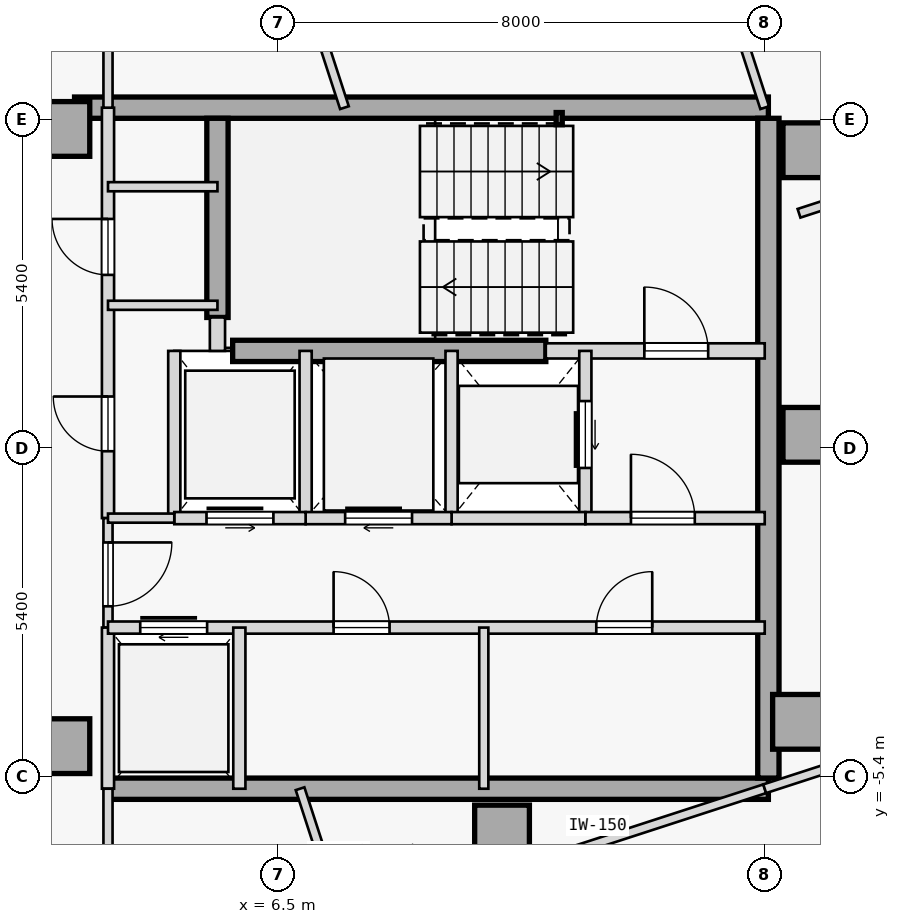
"""IFC4 building model, lengths in metres.
Left out: names, types, materials, properties, quantities, classifications, styles, units other than length and angle.
Written with IfcOpenShell. Run it as: python <this file> out.ifc"""

import sys

from ifc_helpers import new_model, si_unit, direction, frame, frame_2d, origin, origin_2d, place, context, subcontext, project, spatial, rectangle, hollow_rectangle, extrude, element, fill, save


model = new_model("IFC4")
c1 = context("Model", 3, precision=1e-05, world=origin(), true_north=direction((0.0, 1.0)))
c2 = subcontext(c1, "Body", "Model", "MODEL_VIEW")
j1 = project(units=[si_unit("LENGTHUNIT", "METRE"), si_unit("PLANEANGLEUNIT", "RADIAN")], contexts=[c1])
p1 = place(None, origin())
s1 = spatial("IfcSite", under=j1, at=p1, CompositionType="ELEMENT")
p2 = place(p1, origin())
s2 = spatial("IfcBuilding", under=s1, at=p2, CompositionType="ELEMENT")
p3 = place(p2, frame((0.0, 0.0, 241.05)))
s3 = spatial("IfcBuildingStorey", under=s2, at=p3, CompositionType="ELEMENT", Elevation=241.05)
for number, where, z_axis, x_axis in (
    (1, (15.25, 4.9, 0.0), (0.0, 0.0, 1.0), (1.0, 0.0, 0.0)),
    (2, (15.25, 0.22, 0.0), (0.0, 0.0, 1.0), (1.0, 0.0, 0.0)),
    (3, (15.08, -4.5, 0.0), (0.0, 0.0, 1.0), (1.0, 0.0, 0.0)),
    (4, (10.18, -6.32, 0.0), (0.0, 0.0, 1.0), (1.0, 0.0, 0.0)),
    (5, (2.95, -4.9, 0.0), (0.0, 0.0, 1.0), (1.0, 0.0, 0.0)),
    (6, (2.95, 5.25, 0.0), (0.0, 0.0, 1.0), (1.0, 0.0, 0.0)),
):
    element("IfcColumn", number, at=place(p3, frame(where, z_axis=z_axis, x_axis=x_axis)), inside=s3, PredefinedType="COLUMN", context=c2, shape_type="SweptSolid", body=[
        extrude(rectangle(XDim=0.9, YDim=0.9, at=origin_2d()), origin(), (0.0, 0.0, 1.0), 3.35),
    ])
p4 = place(p3, frame((3.15, 5.6, 0.0), z_axis=(0.0, 0.0, 1.0), x_axis=(1.0, 0.0, 0.0)))
e7 = element("IfcWall", 7, at=p4, inside=s3, PredefinedType="SHEAR", context=c2, shape_type="SweptSolid", body=[
    extrude(rectangle(XDim=11.41, YDim=0.35, at=frame_2d((5.705, 0.0))), origin(), (0.0, 0.0, 1.0), 3.125),
])
p5 = place(p3, frame((3.7, -5.6, 0.0), z_axis=(0.0, 0.0, 1.0), x_axis=(1.0, 0.0, 0.0)))
e8 = element("IfcWall", 8, at=p5, inside=s3, PredefinedType="SHEAR", context=c2, shape_type="SweptSolid", body=[
    extrude(rectangle(XDim=10.86, YDim=0.35, at=frame_2d((5.43, 0.0))), origin(), (0.0, 0.0, 1.0), 3.125),
])
p6 = place(p3, frame((14.56, -5.425, 0.0), z_axis=(0.0, 0.0, 1.0), x_axis=(0.0, 1.0, 0.0)))
e9 = element("IfcWall", 9, at=p6, inside=s3, PredefinedType="SHEAR", context=c2, shape_type="SweptSolid", body=[
    extrude(rectangle(XDim=10.85, YDim=0.35, at=frame_2d((5.425, 0.0))), origin(), (0.0, 0.0, 1.0), 3.125),
])
p7 = place(p3, frame((5.5, 2.15, 0.0), z_axis=(0.0, 0.0, 1.0), x_axis=(0.0, 1.0, 0.0)))
e10 = element("IfcWall", 10, at=p7, inside=s3, PredefinedType="SHEAR", context=c2, shape_type="SweptSolid", body=[
    extrude(rectangle(XDim=3.275, YDim=0.35, at=frame_2d((1.638, 0.0))), origin(), (0.0, 0.0, 1.0), 3.125),
])
p8 = place(p3, frame((5.75, 1.6, 0.0), z_axis=(0.0, 0.0, 1.0), x_axis=(1.0, 0.0, 0.0)))
e11 = element("IfcWall", 11, at=p8, inside=s3, PredefinedType="SHEAR", context=c2, shape_type="SweptSolid", body=[
    extrude(rectangle(XDim=5.15, YDim=0.35, at=frame_2d((2.575, 0.0))), origin(), (0.0, 0.0, 1.0), 3.125),
])
p9 = place(p3, frame((11.12, 5.42, 0.0), z_axis=(0.0, 0.0, 1.0), x_axis=(1.0, 0.0, 0.0)))
e12 = element("IfcColumn", 12, at=p9, inside=s3, PredefinedType="COLUMN", context=c2, shape_type="SweptSolid", body=[
    extrude(hollow_rectangle(XDim=0.1, YDim=0.2, WallThickness=0.008, at=origin_2d()), origin(), (0.0, 0.0, 1.0), 3.35),
])
p10 = place(p3, frame((10.9, 1.6, 0.0), z_axis=(0.0, 0.0, 1.0), x_axis=(1.0, 0.0, 0.0)))
e13 = element("IfcWall", 13, at=p10, inside=s3, PredefinedType="STANDARD", context=c2, shape_type="SweptSolid", body=[
    extrude(rectangle(XDim=3.6, YDim=0.25, at=frame_2d((1.8, 0.0))), origin(), (0.0, 0.0, 1.0), 3.125),
])
p11 = place(p10, frame((1.62, 0.0, 0.0)))
e14 = element("IfcOpeningElement", 14, at=p11, cuts=e13, PredefinedType="OPENING", context=c2, shape_type="SweptSolid", body=[
    extrude(rectangle(XDim=1.05, YDim=2.15, at=frame_2d((0.525, 1.075))), frame((0.0, 0.135, 0.0), z_axis=(0.0, -1.0, 0.0), x_axis=(1.0, 0.0, 0.0)), (0.0, 0.0, 1.0), 0.27),
])
p12 = place(p3, frame((5.5, 1.6, 0.0), z_axis=(0.0, 0.0, 1.0), x_axis=(0.0, 1.0, 0.0)))
e15 = element("IfcWall", 15, at=p12, inside=s3, PredefinedType="STANDARD", context=c2, shape_type="SweptSolid", body=[
    extrude(rectangle(XDim=0.55, YDim=0.25, at=frame_2d((0.275, 0.0))), origin(), (0.0, 0.0, 1.0), 3.125),
])
p13 = place(p3, frame((3.7, -1.15, 0.0), z_axis=(0.0, 0.0, 1.0), x_axis=(0.0, 1.0, 0.0)))
e16 = element("IfcWall", 16, at=p13, inside=s3, PredefinedType="STANDARD", context=c2, shape_type="SweptSolid", body=[
    extrude(rectangle(XDim=6.75, YDim=0.2, at=frame_2d((3.375, 0.0))), origin(), (0.0, 0.0, 1.0), 3.125),
])
p14 = place(p13, frame((1.1, 0.0, 0.0)))
e17 = element("IfcOpeningElement", 17, at=p14, cuts=e16, PredefinedType="OPENING", context=c2, shape_type="SweptSolid", body=[
    extrude(rectangle(XDim=0.9, YDim=2.15, at=frame_2d((0.45, 1.075))), frame((0.0, 0.11, 0.0), z_axis=(0.0, -1.0, 0.0), x_axis=(1.0, 0.0, 0.0)), (0.0, 0.0, 1.0), 0.22),
])
p15 = place(p13, frame((4.0, 0.0, 0.0)))
e18 = element("IfcOpeningElement", 18, at=p15, cuts=e16, PredefinedType="OPENING", context=c2, shape_type="SweptSolid", body=[
    extrude(rectangle(XDim=0.92, YDim=2.15, at=frame_2d((0.46, 1.075))), frame((0.0, 0.11, 0.0), z_axis=(0.0, -1.0, 0.0), x_axis=(1.0, 0.0, 0.0)), (0.0, 0.0, 1.0), 0.22),
])
p16 = place(p3, frame((3.7, -2.95, 0.0), z_axis=(0.0, 0.0, 1.0), x_axis=(0.0, 1.0, 0.0)))
e19 = element("IfcWall", 19, at=p16, inside=s3, PredefinedType="PARTITIONING", context=c2, shape_type="SweptSolid", body=[
    extrude(rectangle(XDim=1.8, YDim=0.15, at=frame_2d((0.9, 0.0))), origin(), (0.0, 0.0, 1.0), 3.125),
])
p17 = place(p16, frame((0.35, 0.0, 0.0)))
e20 = element("IfcOpeningElement", 20, at=p17, cuts=e19, PredefinedType="OPENING", context=c2, shape_type="SweptSolid", body=[
    extrude(rectangle(XDim=1.05, YDim=2.18, at=frame_2d((0.525, 1.09))), frame((0.0, 0.085, 0.0), z_axis=(0.0, -1.0, 0.0), x_axis=(1.0, 0.0, 0.0)), (0.0, 0.0, 1.0), 0.17),
])
p18 = place(p3, frame((3.7, -5.6, 0.0), z_axis=(0.0, 0.0, 1.0), x_axis=(0.0, 1.0, 0.0)))
e21 = element("IfcWall", 21, at=p18, inside=s3, PredefinedType="STANDARD", context=c2, shape_type="SweptSolid", body=[
    extrude(rectangle(XDim=2.65, YDim=0.2, at=frame_2d((1.325, 0.0))), origin(), (0.0, 0.0, 1.0), 3.125),
])
p19 = place(p3, frame((11.55, -1.15, 0.0), z_axis=(0.0, 0.0, 1.0), x_axis=(0.0, 1.0, 0.0)))
e22 = element("IfcWall", 22, at=p19, inside=s3, PredefinedType="STANDARD", context=c2, shape_type="SweptSolid", body=[
    extrude(rectangle(XDim=2.75, YDim=0.2, at=frame_2d((1.375, 0.0))), origin(), (0.0, 0.0, 1.0), 3.125),
])
p20 = place(p19, frame((0.825, 0.0, 0.0)))
e23 = element("IfcOpeningElement", 23, at=p20, cuts=e22, PredefinedType="OPENING", context=c2, shape_type="SweptSolid", body=[
    extrude(rectangle(XDim=1.1, YDim=2.15, at=frame_2d((0.55, 1.075))), frame((0.0, 0.11, 0.0), z_axis=(0.0, -1.0, 0.0), x_axis=(1.0, 0.0, 0.0)), (0.0, 0.0, 1.0), 0.22),
])
p21 = place(p3, frame((9.35, -1.15, 0.0), z_axis=(0.0, 0.0, 1.0), x_axis=(0.0, 1.0, 0.0)))
e24 = element("IfcWall", 24, at=p21, inside=s3, PredefinedType="STANDARD", context=c2, shape_type="SweptSolid", body=[
    extrude(rectangle(XDim=2.75, YDim=0.2, at=frame_2d((1.375, 0.0))), origin(), (0.0, 0.0, 1.0), 3.125),
])
p22 = place(p3, frame((11.55, -1.15, 0.0), z_axis=(0.0, 0.0, 1.0), x_axis=(1.0, 0.0, 0.0)))
e25 = element("IfcWall", 25, at=p22, inside=s3, PredefinedType="STANDARD", context=c2, shape_type="SweptSolid", body=[
    extrude(rectangle(XDim=2.95, YDim=0.2, at=frame_2d((1.475, 0.0))), origin(), (0.0, 0.0, 1.0), 3.125),
])
p23 = place(p22, frame((0.75, 0.0, 0.0)))
e26 = element("IfcOpeningElement", 26, at=p23, cuts=e25, PredefinedType="OPENING", context=c2, shape_type="SweptSolid", body=[
    extrude(rectangle(XDim=1.05, YDim=2.18, at=frame_2d((0.525, 1.09))), frame((0.0, 0.11, 0.0), z_axis=(0.0, -1.0, 0.0), x_axis=(1.0, 0.0, 0.0)), (0.0, 0.0, 1.0), 0.22),
])
p24 = place(p3, frame((9.35, -1.15, 0.0), z_axis=(0.0, 0.0, 1.0), x_axis=(1.0, 0.0, 0.0)))
e27 = element("IfcWall", 27, at=p24, inside=s3, PredefinedType="STANDARD", context=c2, shape_type="SweptSolid", body=[
    extrude(rectangle(XDim=2.2, YDim=0.2, at=frame_2d((1.1, 0.0))), origin(), (0.0, 0.0, 1.0), 3.125),
])
p25 = place(p3, frame((6.95, -1.15, 0.0), z_axis=(0.0, 0.0, 1.0), x_axis=(0.0, 1.0, 0.0)))
e28 = element("IfcWall", 28, at=p25, inside=s3, PredefinedType="STANDARD", context=c2, shape_type="SweptSolid", body=[
    extrude(rectangle(XDim=2.75, YDim=0.2, at=frame_2d((1.375, 0.0))), origin(), (0.0, 0.0, 1.0), 3.125),
])
p26 = place(p3, frame((6.95, -1.15, 0.0), z_axis=(0.0, 0.0, 1.0), x_axis=(1.0, 0.0, 0.0)))
e29 = element("IfcWall", 29, at=p26, inside=s3, PredefinedType="STANDARD", context=c2, shape_type="SweptSolid", body=[
    extrude(rectangle(XDim=2.4, YDim=0.2, at=frame_2d((1.2, 0.0))), origin(), (0.0, 0.0, 1.0), 3.125),
])
p27 = place(p26, frame((0.65, 0.0, 0.0)))
e30 = element("IfcOpeningElement", 30, at=p27, cuts=e29, PredefinedType="OPENING", context=c2, shape_type="SweptSolid", body=[
    extrude(rectangle(XDim=1.1, YDim=2.15, at=frame_2d((0.55, 1.075))), frame((0.0, 0.11, 0.0), z_axis=(0.0, -1.0, 0.0), x_axis=(1.0, 0.0, 0.0)), (0.0, 0.0, 1.0), 0.22),
])
p28 = place(p3, frame((4.79, -1.15, 0.0), z_axis=(0.0, 0.0, 1.0), x_axis=(0.0, 1.0, 0.0)))
e31 = element("IfcWall", 31, at=p28, inside=s3, PredefinedType="STANDARD", context=c2, shape_type="SweptSolid", body=[
    extrude(rectangle(XDim=2.75, YDim=0.2, at=frame_2d((1.375, 0.0))), origin(), (0.0, 0.0, 1.0), 3.125),
])
p29 = place(p3, frame((4.79, -1.15, 0.0), z_axis=(0.0, 0.0, 1.0), x_axis=(1.0, 0.0, 0.0)))
e32 = element("IfcWall", 32, at=p29, inside=s3, PredefinedType="STANDARD", context=c2, shape_type="SweptSolid", body=[
    extrude(rectangle(XDim=2.16, YDim=0.2, at=frame_2d((1.08, 0.0))), origin(), (0.0, 0.0, 1.0), 3.125),
])
p30 = place(p29, frame((0.53, 0.0, 0.0)))
e33 = element("IfcOpeningElement", 33, at=p30, cuts=e32, PredefinedType="OPENING", context=c2, shape_type="SweptSolid", body=[
    extrude(rectangle(XDim=1.1, YDim=2.15, at=frame_2d((0.55, 1.075))), frame((0.0, 0.11, 0.0), z_axis=(0.0, -1.0, 0.0), x_axis=(1.0, 0.0, 0.0)), (0.0, 0.0, 1.0), 0.22),
])
p31 = place(p3, frame((3.7, -1.15, 0.0), z_axis=(0.0, 0.0, 1.0), x_axis=(1.0, 0.0, 0.0)))
e34 = element("IfcWall", 34, at=p31, inside=s3, PredefinedType="PARTITIONING", context=c2, shape_type="SweptSolid", body=[
    extrude(rectangle(XDim=1.09, YDim=0.15, at=frame_2d((0.545, 0.0))), origin(), (0.0, 0.0, 1.0), 3.125),
])
p32 = place(p3, frame((3.7, -2.95, 0.0), z_axis=(0.0, 0.0, 1.0), x_axis=(1.0, 0.0, 0.0)))
e35 = element("IfcWall", 35, at=p32, inside=s3, PredefinedType="STANDARD", context=c2, shape_type="SweptSolid", body=[
    extrude(rectangle(XDim=10.8, YDim=0.2, at=frame_2d((5.4, 0.0))), origin(), (0.0, 0.0, 1.0), 3.125),
])
p33 = place(p32, frame((0.53, 0.0, 0.0)))
e36 = element("IfcOpeningElement", 36, at=p33, cuts=e35, PredefinedType="OPENING", context=c2, shape_type="SweptSolid", body=[
    extrude(rectangle(XDim=1.1, YDim=2.15, at=frame_2d((0.55, 1.075))), frame((0.0, 0.11, 0.0), z_axis=(0.0, -1.0, 0.0), x_axis=(1.0, 0.0, 0.0)), (0.0, 0.0, 1.0), 0.22),
])
p34 = place(p32, frame((3.71, 0.0, 0.0)))
e37 = element("IfcOpeningElement", 37, at=p34, cuts=e35, PredefinedType="OPENING", context=c2, shape_type="SweptSolid", body=[
    extrude(rectangle(XDim=0.92, YDim=2.15, at=frame_2d((0.46, 1.075))), frame((0.0, 0.11, 0.0), z_axis=(0.0, -1.0, 0.0), x_axis=(1.0, 0.0, 0.0)), (0.0, 0.0, 1.0), 0.22),
])
p35 = place(p32, frame((8.03, 0.0, 0.0)))
e38 = element("IfcOpeningElement", 38, at=p35, cuts=e35, PredefinedType="OPENING", context=c2, shape_type="SweptSolid", body=[
    extrude(rectangle(XDim=0.92, YDim=2.15, at=frame_2d((0.46, 1.075))), frame((0.0, 0.11, 0.0), z_axis=(0.0, -1.0, 0.0), x_axis=(1.0, 0.0, 0.0)), (0.0, 0.0, 1.0), 0.22),
])
p36 = place(p3, frame((5.86, -5.6, 0.0), z_axis=(0.0, 0.0, 1.0), x_axis=(0.0, 1.0, 0.0)))
e39 = element("IfcWall", 39, at=p36, inside=s3, PredefinedType="STANDARD", context=c2, shape_type="SweptSolid", body=[
    extrude(rectangle(XDim=2.65, YDim=0.2, at=frame_2d((1.325, 0.0))), origin(), (0.0, 0.0, 1.0), 3.125),
])
p37 = place(p3, frame((9.88, -5.6, 0.0), z_axis=(0.0, 0.0, 1.0), x_axis=(0.0, 1.0, 0.0)))
e40 = element("IfcWall", 40, at=p37, inside=s3, PredefinedType="PARTITIONING", context=c2, shape_type="SweptSolid", body=[
    extrude(rectangle(XDim=2.65, YDim=0.15, at=frame_2d((1.325, 0.0))), origin(), (0.0, 0.0, 1.0), 3.125),
])
for number, where, z_axis, x_axis in (
    (41, (3.7, 4.3, 0.0), (0.0, 0.0, 1.0), (1.0, 0.0, 0.0)),
    (42, (3.7, 2.35, 0.0), (0.0, 0.0, 1.0), (1.0, 0.0, 0.0)),
):
    element("IfcWall", number, at=place(p3, frame(where, z_axis=z_axis, x_axis=x_axis)), inside=s3, PredefinedType="PARTITIONING", context=c2, shape_type="SweptSolid", body=[
        extrude(rectangle(XDim=1.8, YDim=0.15, at=frame_2d((0.9, 0.0))), origin(), (0.0, 0.0, 1.0), 3.125),
    ])
p38 = place(p3, frame((13.589, -7.6, 0.0), z_axis=(0.0, 0.0, 1.0), x_axis=(0.95105023481, 0.30903632613, 0.0)))
e43 = element("IfcWall", 43, at=p38, inside=s3, PredefinedType="PARTITIONING", context=c2, shape_type="SweptSolid", body=[
    extrude(rectangle(XDim=3.773, YDim=0.15, at=frame_2d((1.886, 0.0))), origin(), (0.0, 0.0, 1.0), 3.125),
])
p39 = place(p3, frame((3.7, -9.109, 0.0), z_axis=(0.0, 0.0, 1.0), x_axis=(-0.000139130433, 0.999999990321, 0.0)))
e44 = element("IfcWall", 44, at=p39, inside=s3, PredefinedType="PARTITIONING", context=c2, shape_type="SweptSolid", body=[
    extrude(rectangle(XDim=3.51, YDim=0.15, at=frame_2d((1.755, 0.0))), origin(), (0.0, 0.0, 1.0), 3.125),
])
p40 = place(p3, frame((7.588, -7.846, 0.0), z_axis=(0.0, 0.0, 1.0), x_axis=(0.951058013903, 0.309012385174, 0.0)))
e45 = element("IfcWall", 45, at=p40, inside=s3, PredefinedType="PARTITIONING", context=c2, shape_type="SweptSolid", body=[
    extrude(rectangle(XDim=7.267, YDim=0.15, at=frame_2d((3.634, 0.0))), origin(), (0.0, 0.0, 1.0), 3.125),
])
p41 = place(p40, frame((0.557, 0.0, 0.0)))
e46 = element("IfcOpeningElement", 46, at=p41, cuts=e45, PredefinedType="OPENING", context=c2, shape_type="SweptSolid", body=[
    extrude(rectangle(XDim=0.92, YDim=2.15, at=frame_2d((0.46, 1.075))), frame((0.0, 0.085, 0.0), z_axis=(0.0, -1.0, 0.0), x_axis=(1.0, 0.0, 0.0)), (0.0, 0.0, 1.0), 0.17),
])
p42 = place(p3, frame((14.5, -5.6, 0.0), z_axis=(0.0, 0.0, 1.0), x_axis=(0.951047546178, 0.309044600193, 0.0)))
e47 = element("IfcWall", 47, at=p42, inside=s3, PredefinedType="PARTITIONING", context=c2, shape_type="SweptSolid", body=[
    extrude(rectangle(XDim=3.461, YDim=0.15, at=frame_2d((1.73, 0.0))), origin(), (0.0, 0.0, 1.0), 3.125),
])
p43 = place(p42, frame((1.79, 0.0, 0.0)))
e48 = element("IfcOpeningElement", 48, at=p43, cuts=e47, PredefinedType="OPENING", context=c2, shape_type="SweptSolid", body=[
    extrude(rectangle(XDim=0.92, YDim=2.15, at=frame_2d((0.46, 1.075))), frame((0.0, 0.085, 0.0), z_axis=(0.0, -1.0, 0.0), x_axis=(1.0, 0.0, 0.0)), (0.0, 0.0, 1.0), 0.17),
])
p44 = place(p3, frame((3.7, 5.6, 0.0), z_axis=(0.0, 0.0, 1.0), x_axis=(-0.000123839008, 0.999999992332, 0.0)))
e49 = element("IfcWall", 49, at=p44, inside=s3, PredefinedType="PARTITIONING", context=c2, shape_type="SweptSolid", body=[
    extrude(rectangle(XDim=5.914, YDim=0.15, at=frame_2d((2.957, 0.0))), origin(), (0.0, 0.0, 1.0), 2.675),
])
p45 = place(p44, frame((2.497, 0.0, 0.0)))
e50 = element("IfcOpeningElement", 50, at=p45, cuts=e49, PredefinedType="OPENING", context=c2, shape_type="SweptSolid", body=[
    extrude(rectangle(XDim=0.92, YDim=2.15, at=frame_2d((0.46, 1.075))), frame((0.0, 0.085, 0.0), z_axis=(0.0, -1.0, 0.0), x_axis=(1.0, 0.0, 0.0)), (0.0, 0.0, 1.0), 0.17),
])
p46 = place(p3, frame((7.588, -7.846, 0.0), z_axis=(0.0, 0.0, 1.0), x_axis=(-0.309055688452, 0.951043942957, 0.0)))
e51 = element("IfcWall", 51, at=p46, inside=s3, PredefinedType="PARTITIONING", context=c2, shape_type="SweptSolid", body=[
    extrude(rectangle(XDim=2.362, YDim=0.15, at=frame_2d((1.181, 0.0))), origin(), (0.0, 0.0, 1.0), 3.125),
])
p47 = place(p3, frame((7.588, 5.6, 0.0), z_axis=(0.0, 0.0, 1.0), x_axis=(-0.309018946982, 0.951055881852, 0.0)))
e52 = element("IfcWall", 52, at=p47, inside=s3, PredefinedType="PARTITIONING", context=c2, shape_type="SweptSolid", body=[
    extrude(rectangle(XDim=6.826, YDim=0.15, at=frame_2d((3.413, 0.0))), origin(), (0.0, 0.0, 1.0), 3.125),
])
p48 = place(p3, frame((14.5, 5.6, 0.0), z_axis=(0.0, 0.0, 1.0), x_axis=(-0.308974360462, 0.951070367837, 0.0)))
e53 = element("IfcWall", 53, at=p48, inside=s3, PredefinedType="PARTITIONING", context=c2, shape_type="SweptSolid", body=[
    extrude(rectangle(XDim=4.843, YDim=0.15, at=frame_2d((2.421, 0.0))), origin(), (0.0, 0.0, 1.0), 3.125),
])
p49 = place(p3, frame((15.064, 3.863, 0.0), z_axis=(0.0, 0.0, 1.0), x_axis=(0.951061448945, 0.309001812827, 0.0)))
e54 = element("IfcWall", 54, at=p49, inside=s3, PredefinedType="PARTITIONING", context=c2, shape_type="SweptSolid", body=[
    extrude(rectangle(XDim=10.352, YDim=0.15, at=frame_2d((5.176, 0.0))), origin(), (0.0, 0.0, 1.0), 3.125),
])
p50 = place(p49, frame((4.716, 0.0, 0.0)))
e55 = element("IfcOpeningElement", 55, at=p50, cuts=e54, PredefinedType="OPENING", context=c2, shape_type="SweptSolid", body=[
    extrude(rectangle(XDim=0.92, YDim=2.15, at=frame_2d((0.46, 1.075))), frame((0.0, 0.085, 0.0), z_axis=(0.0, -1.0, 0.0), x_axis=(1.0, 0.0, 0.0)), (0.0, 0.0, 1.0), 0.17),
])
p51 = place(p11, origin())
e56 = element("IfcDoor", 56, at=p51, inside=s3, OperationType="SINGLE_SWING_LEFT", PredefinedType="DOOR", context=c2, shape_type="SweptSolid", body=[
    extrude(rectangle(XDim=1.05, YDim=2.15, at=frame_2d((0.525, 1.075))), frame((0.0, 0.025, 0.0), z_axis=(0.0, -1.0, 0.0), x_axis=(1.0, 0.0, 0.0)), (0.0, 0.0, 1.0), 0.05),
])
fill(e14, e56)
p52 = place(p23, origin())
e57 = element("IfcDoor", 57, at=p52, inside=s3, OperationType="SINGLE_SWING_LEFT", PredefinedType="DOOR", context=c2, shape_type="SweptSolid", body=[
    extrude(rectangle(XDim=1.05, YDim=2.18, at=frame_2d((0.525, 1.09))), frame((0.0, 0.025, 0.0), z_axis=(0.0, -1.0, 0.0), x_axis=(1.0, 0.0, 0.0)), (0.0, 0.0, 1.0), 0.05),
])
fill(e26, e57)
p53 = place(p17, frame((1.05, 0.0, 0.0), z_axis=(0.0, 0.0, 1.0), x_axis=(-1.0, 0.0, 0.0)))
e58 = element("IfcDoor", 58, at=p53, inside=s3, OperationType="SINGLE_SWING_RIGHT", PredefinedType="DOOR", context=c2, shape_type="SweptSolid", body=[
    extrude(rectangle(XDim=1.05, YDim=2.18, at=frame_2d((0.525, 1.09))), frame((0.0, 0.025, 0.0), z_axis=(0.0, -1.0, 0.0), x_axis=(1.0, 0.0, 0.0)), (0.0, 0.0, 1.0), 0.05),
])
fill(e20, e58)
p54 = place(p20, origin())
e59 = element("IfcDoor", 59, at=p54, inside=s3, OperationType="SLIDING_TO_RIGHT", PredefinedType="DOOR", context=c2, shape_type="SweptSolid", body=[
    extrude(rectangle(XDim=1.1, YDim=2.15, at=frame_2d((0.55, 1.075))), frame((0.0, 0.025, 0.0), z_axis=(0.0, -1.0, 0.0), x_axis=(1.0, 0.0, 0.0)), (0.0, 0.0, 1.0), 0.05),
])
fill(e23, e59)
p55 = place(p27, origin())
e60 = element("IfcDoor", 60, at=p55, inside=s3, OperationType="SLIDING_TO_RIGHT", PredefinedType="DOOR", context=c2, shape_type="SweptSolid", body=[
    extrude(rectangle(XDim=1.1, YDim=2.15, at=frame_2d((0.55, 1.075))), frame((0.0, 0.025, 0.0), z_axis=(0.0, -1.0, 0.0), x_axis=(1.0, 0.0, 0.0)), (0.0, 0.0, 1.0), 0.05),
])
fill(e30, e60)
p56 = place(p30, origin())
e61 = element("IfcDoor", 61, at=p56, inside=s3, OperationType="SLIDING_TO_LEFT", PredefinedType="DOOR", context=c2, shape_type="SweptSolid", body=[
    extrude(rectangle(XDim=1.1, YDim=2.15, at=frame_2d((0.55, 1.075))), frame((0.0, 0.025, 0.0), z_axis=(0.0, -1.0, 0.0), x_axis=(1.0, 0.0, 0.0)), (0.0, 0.0, 1.0), 0.05),
])
fill(e33, e61)
p57 = place(p33, origin())
e62 = element("IfcDoor", 62, at=p57, inside=s3, OperationType="SLIDING_TO_RIGHT", PredefinedType="DOOR", context=c2, shape_type="SweptSolid", body=[
    extrude(rectangle(XDim=1.1, YDim=2.15, at=frame_2d((0.55, 1.075))), frame((0.0, 0.025, 0.0), z_axis=(0.0, -1.0, 0.0), x_axis=(1.0, 0.0, 0.0)), (0.0, 0.0, 1.0), 0.05),
])
fill(e36, e62)
p58 = place(p34, origin())
e63 = element("IfcDoor", 63, at=p58, inside=s3, OperationType="SINGLE_SWING_LEFT", PredefinedType="DOOR", context=c2, shape_type="SweptSolid", body=[
    extrude(rectangle(XDim=0.92, YDim=2.15, at=frame_2d((0.46, 1.075))), frame((0.0, 0.025, 0.0), z_axis=(0.0, -1.0, 0.0), x_axis=(1.0, 0.0, 0.0)), (0.0, 0.0, 1.0), 0.05),
])
fill(e37, e63)
p59 = place(p35, origin())
e64 = element("IfcDoor", 64, at=p59, inside=s3, OperationType="SINGLE_SWING_RIGHT", PredefinedType="DOOR", context=c2, shape_type="SweptSolid", body=[
    extrude(rectangle(XDim=0.92, YDim=2.15, at=frame_2d((0.46, 1.075))), frame((0.0, 0.025, 0.0), z_axis=(0.0, -1.0, 0.0), x_axis=(1.0, 0.0, 0.0)), (0.0, 0.0, 1.0), 0.05),
])
fill(e38, e64)
p60 = place(p14, origin())
e65 = element("IfcDoor", 65, at=p60, inside=s3, OperationType="SINGLE_SWING_RIGHT", PredefinedType="DOOR", context=c2, shape_type="SweptSolid", body=[
    extrude(rectangle(XDim=0.9, YDim=2.15, at=frame_2d((0.45, 1.075))), frame((0.0, 0.025, 0.0), z_axis=(0.0, -1.0, 0.0), x_axis=(1.0, 0.0, 0.0)), (0.0, 0.0, 1.0), 0.05),
])
fill(e17, e65)
p61 = place(p15, origin())
e66 = element("IfcDoor", 66, at=p61, inside=s3, OperationType="SINGLE_SWING_RIGHT", PredefinedType="DOOR", context=c2, shape_type="SweptSolid", body=[
    extrude(rectangle(XDim=0.92, YDim=2.15, at=frame_2d((0.46, 1.075))), frame((0.0, 0.025, 0.0), z_axis=(0.0, -1.0, 0.0), x_axis=(1.0, 0.0, 0.0)), (0.0, 0.0, 1.0), 0.05),
])
fill(e18, e66)
save(model, sys.argv[1])
